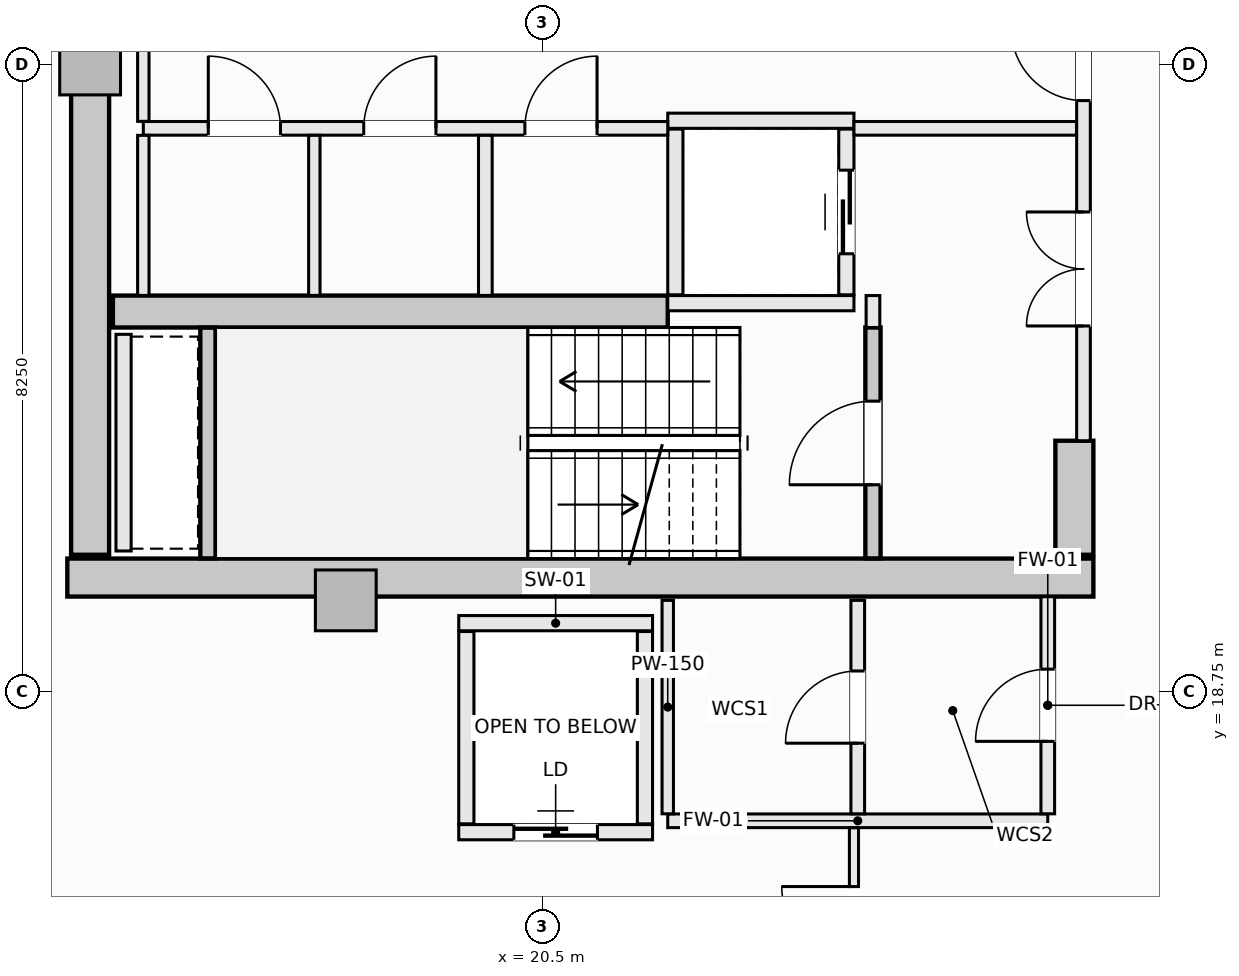
"""IFC4 building model, lengths in metres.
Left out: names, types, materials, properties, quantities, classifications, styles, units other than length and angle.
Written with IfcOpenShell. Run it as: python <this file> out.ifc"""

import sys

from ifc_helpers import new_model, si_unit, direction, frame, frame_2d, origin, origin_2d, place, context, subcontext, project, spatial, rectangle, extrude, element, fill, save


model = new_model("IFC4")
c1 = context("Model", 3, precision=1e-05, world=origin(), true_north=direction((0.0, 1.0)))
c2 = subcontext(c1, "Body", "Model", "MODEL_VIEW")
j1 = project(units=[si_unit("LENGTHUNIT", "METRE"), si_unit("PLANEANGLEUNIT", "RADIAN")], contexts=[c1])
p1 = place(None, origin())
s1 = spatial("IfcSite", under=j1, at=p1, CompositionType="ELEMENT")
p2 = place(p1, origin())
s2 = spatial("IfcBuilding", under=s1, at=p2, CompositionType="ELEMENT")
p3 = place(p2, frame((0.0, 0.0, 203.0)))
s3 = spatial("IfcBuildingStorey", under=s2, at=p3, CompositionType="ELEMENT", Elevation=203.0)
p4 = place(p3, frame((14.25, 20.25, -0.27), z_axis=(0.0, 0.0, 1.0), x_axis=(1.0, 0.0, 0.0)))
e1 = element("IfcWall", 1, at=p4, inside=s3, PredefinedType="SHEAR", context=c2, shape_type="SweptSolid", body=[
    extrude(rectangle(XDim=13.5, YDim=0.5, at=frame_2d((6.75, 0.0))), origin(), (0.0, 0.0, 1.0), 3.3),
])
p5 = place(p3, frame((14.55, 20.55, -0.27), z_axis=(0.0, 0.0, 1.0), x_axis=(0.0, 1.0, 0.0)))
e2 = element("IfcWall", 2, at=p5, inside=s3, PredefinedType="SHEAR", context=c2, shape_type="SweptSolid", body=[
    extrude(rectangle(XDim=12.9, YDim=0.5, at=frame_2d((6.45, 0.0))), origin(), (0.0, 0.0, 1.0), 3.3),
])
p6 = place(p3, frame((27.5, 20.55, -0.27), z_axis=(0.0, 0.0, 1.0), x_axis=(0.0, 1.0, 0.0)))
e3 = element("IfcWall", 3, at=p6, inside=s3, PredefinedType="SHEAR", context=c2, shape_type="SweptSolid", body=[
    extrude(rectangle(XDim=1.5, YDim=0.5, at=frame_2d((0.75, 0.0))), origin(), (0.0, 0.0, 1.0), 3.3),
])
p7 = place(p3, frame((14.85, 23.75, -0.27), z_axis=(0.0, 0.0, 1.0), x_axis=(1.0, 0.0, 0.0)))
e4 = element("IfcWall", 4, at=p7, inside=s3, PredefinedType="SHEAR", context=c2, shape_type="SweptSolid", body=[
    extrude(rectangle(XDim=7.3, YDim=0.42, at=frame_2d((3.65, 0.0))), origin(), (0.0, 0.0, 1.0), 3.3),
])
for number, where, z_axis, x_axis in (
    (5, (14.55, 27.0, -0.27), (0.0, 0.0, 1.0), (1.0, 0.0, 0.0)),
    (6, (17.914, 19.95, -0.27), (0.0, 0.0, 1.0), (1.0, 0.0, 0.0)),
):
    element("IfcColumn", number, at=place(p3, frame(where, z_axis=z_axis, x_axis=x_axis)), inside=s3, PredefinedType="PILASTER", context=c2, shape_type="SweptSolid", body=[
        extrude(rectangle(XDim=0.8, YDim=0.8, at=origin_2d()), origin(), (0.0, 0.0, 1.0), 3.3),
    ])
p8 = place(p3, frame((8.691, 17.1, 0.0), z_axis=(0.0, 0.0, 1.0), x_axis=(0.901348331142, -0.433094892545, 0.0)))
e7 = element("IfcWall", 7, at=p8, inside=s3, PredefinedType="SOLIDWALL", context=c2, shape_type="SweptSolid", body=[
    extrude(rectangle(XDim=6.021, YDim=0.3, at=frame_2d((3.01, 0.0))), origin(), (0.0, 0.0, 1.0), 2.605),
])
p9 = place(p8, frame((2.85, 0.0, 0.72)))
e8 = element("IfcOpeningElement", 8, at=p9, cuts=e7, PredefinedType="OPENING", context=c2, shape_type="SweptSolid", body=[
    extrude(rectangle(XDim=2.2, YDim=1.65, at=frame_2d((1.1, 0.825))), frame((0.0, 0.16, 0.0), z_axis=(0.0, -1.0, 0.0), x_axis=(1.0, 0.0, 0.0)), (0.0, 0.0, 1.0), 0.32),
])
p10 = place(p3, frame((24.85, 20.502, -0.27), z_axis=(0.0, 0.0, 1.0), x_axis=(0.0, 1.0, 0.0)))
e9 = element("IfcWall", 9, at=p10, inside=s3, PredefinedType="SHEAR", context=c2, shape_type="SweptSolid", body=[
    extrude(rectangle(XDim=3.038, YDim=0.2, at=frame_2d((1.519, 0.0))), origin(), (0.0, 0.0, 1.0), 3.3),
])
p11 = place(p10, frame((0.969, 0.0, 0.27)))
e10 = element("IfcOpeningElement", 10, at=p11, cuts=e9, PredefinedType="OPENING", context=c2, shape_type="SweptSolid", body=[
    extrude(rectangle(XDim=1.1, YDim=2.15, at=frame_2d((0.55, 1.075))), frame((0.0, 0.11, 0.0), z_axis=(0.0, -1.0, 0.0), x_axis=(1.0, 0.0, 0.0)), (0.0, 0.0, 1.0), 0.22),
])
p12 = place(p3, frame((16.1, 20.502, -0.27), z_axis=(0.0, 0.0, 1.0), x_axis=(0.0, 1.0, 0.0)))
e11 = element("IfcWall", 11, at=p12, inside=s3, PredefinedType="SHEAR", context=c2, shape_type="SweptSolid", body=[
    extrude(rectangle(XDim=3.036, YDim=0.2, at=frame_2d((1.518, 0.0))), origin(), (0.0, 0.0, 1.0), 3.3),
])
for number, where, z_axis, x_axis in (
    (12, (22.15, 26.26, 0.0), (0.0, 0.0, 1.0), (1.0, 0.0, 0.0)),
    (13, (22.15, 23.86, 0.0), (0.0, 0.0, 1.0), (1.0, 0.0, 0.0)),
):
    element("IfcWall", number, at=place(p3, frame(where, z_axis=z_axis, x_axis=x_axis)), inside=s3, PredefinedType="SOLIDWALL", context=c2, shape_type="SweptSolid", body=[
        extrude(rectangle(XDim=2.45, YDim=0.2, at=frame_2d((1.225, 0.0))), origin(), (0.0, 0.0, 1.0), 3.03),
    ])
p13 = place(p3, frame((22.25, 23.97, 0.0), z_axis=(0.0, 0.0, 1.0), x_axis=(0.0, 1.0, 0.0)))
e14 = element("IfcWall", 14, at=p13, inside=s3, PredefinedType="SOLIDWALL", context=c2, shape_type="SweptSolid", body=[
    extrude(rectangle(XDim=2.18, YDim=0.2, at=frame_2d((1.09, 0.0))), origin(), (0.0, 0.0, 1.0), 3.03),
])
p14 = place(p3, frame((24.5, 23.97, 0.0), z_axis=(0.0, 0.0, 1.0), x_axis=(0.0, 1.0, 0.0)))
e15 = element("IfcWall", 15, at=p14, inside=s3, PredefinedType="SOLIDWALL", context=c2, shape_type="SweptSolid", body=[
    extrude(rectangle(XDim=2.18, YDim=0.2, at=frame_2d((1.09, 0.0))), origin(), (0.0, 0.0, 1.0), 3.03),
])
p15 = place(p14, frame((0.54, 0.0, 0.0)))
e16 = element("IfcOpeningElement", 16, at=p15, cuts=e15, PredefinedType="OPENING", context=c2, shape_type="SweptSolid", body=[
    extrude(rectangle(XDim=1.1, YDim=2.2, at=frame_2d((0.55, 1.1))), frame((0.0, 0.11, 0.0), z_axis=(0.0, -1.0, 0.0), x_axis=(1.0, 0.0, 0.0)), (0.0, 0.0, 1.0), 0.22),
])
p16 = place(p3, frame((19.4, 19.65, 0.0), z_axis=(0.0, 0.0, 1.0), x_axis=(1.0, 0.0, 0.0)))
e17 = element("IfcWall", 17, at=p16, inside=s3, PredefinedType="SOLIDWALL", context=c2, shape_type="SweptSolid", body=[
    extrude(rectangle(XDim=2.55, YDim=0.2, at=frame_2d((1.275, 0.0))), origin(), (0.0, 0.0, 1.0), 3.03),
])
p17 = place(p3, frame((19.4, 16.9, 0.0), z_axis=(0.0, 0.0, 1.0), x_axis=(1.0, 0.0, 0.0)))
e18 = element("IfcWall", 18, at=p17, inside=s3, PredefinedType="SOLIDWALL", context=c2, shape_type="SweptSolid", body=[
    extrude(rectangle(XDim=2.55, YDim=0.2, at=frame_2d((1.275, 0.0))), origin(), (0.0, 0.0, 1.0), 3.03),
])
p18 = place(p17, frame((0.725, 0.0, 0.0)))
e19 = element("IfcOpeningElement", 19, at=p18, cuts=e18, PredefinedType="OPENING", context=c2, shape_type="SweptSolid", body=[
    extrude(rectangle(XDim=1.1, YDim=2.2, at=frame_2d((0.55, 1.1))), frame((0.0, 0.11, 0.0), z_axis=(0.0, -1.0, 0.0), x_axis=(1.0, 0.0, 0.0)), (0.0, 0.0, 1.0), 0.22),
])
for number, where, z_axis, x_axis in (
    (20, (19.5, 17.01, 0.0), (0.0, 0.0, 1.0), (0.0, 1.0, 0.0)),
    (21, (21.85, 17.01, 0.0), (0.0, 0.0, 1.0), (0.0, 1.0, 0.0)),
):
    element("IfcWall", number, at=place(p3, frame(where, z_axis=z_axis, x_axis=x_axis)), inside=s3, PredefinedType="SOLIDWALL", context=c2, shape_type="SweptSolid", body=[
        extrude(rectangle(XDim=2.53, YDim=0.2, at=frame_2d((1.265, 0.0))), origin(), (0.0, 0.0, 1.0), 3.03),
    ])
p19 = place(p3, frame((14.99, 20.6, 0.0), z_axis=(0.0, 0.0, 1.0), x_axis=(0.0, 1.0, 0.0)))
e22 = element("IfcWall", 22, at=p19, inside=s3, PredefinedType="SOLIDWALL", context=c2, shape_type="SweptSolid", body=[
    extrude(rectangle(XDim=2.85, YDim=0.2, at=frame_2d((1.425, 0.0))), origin(), (0.0, 0.0, 1.0), 3.03),
])
p20 = place(p3, frame((24.85, 23.54, 0.0), z_axis=(0.0, 0.0, 1.0), x_axis=(0.0, 1.0, 0.0)))
e23 = element("IfcWall", 23, at=p20, inside=s3, PredefinedType="SOLIDWALL", context=c2, shape_type="SweptSolid", body=[
    extrude(rectangle(XDim=0.42, YDim=0.18, at=frame_2d((0.21, 0.0))), origin(), (0.0, 0.0, 1.0), 3.03),
])
p21 = place(p3, frame((27.62, 22.05, 0.0), z_axis=(0.0, 0.0, 1.0), x_axis=(0.0, 1.0, 0.0)))
e24 = element("IfcWall", 24, at=p21, inside=s3, PredefinedType="SOLIDWALL", context=c2, shape_type="SweptSolid", body=[
    extrude(rectangle(XDim=9.9, YDim=0.18, at=frame_2d((4.95, 0.0))), origin(), (0.0, 0.0, 1.0), 3.03),
])
p22 = place(p21, frame((4.475, 0.0, 0.0)))
e25 = element("IfcOpeningElement", 25, at=p22, cuts=e24, PredefinedType="OPENING", context=c2, shape_type="SweptSolid", body=[
    extrude(rectangle(XDim=0.95, YDim=2.1, at=frame_2d((0.475, 1.05))), frame((0.0, 0.1, 0.0), z_axis=(0.0, -1.0, 0.0), x_axis=(1.0, 0.0, 0.0)), (0.0, 0.0, 1.0), 0.2),
])
p23 = place(p21, frame((6.89, 0.0, 0.0)))
e26 = element("IfcOpeningElement", 26, at=p23, cuts=e24, PredefinedType="OPENING", context=c2, shape_type="SweptSolid", body=[
    extrude(rectangle(XDim=1.5, YDim=2.2, at=frame_2d((0.75, 1.1))), frame((0.0, 0.1, 0.0), z_axis=(0.0, -1.0, 0.0), x_axis=(1.0, 0.0, 0.0)), (0.0, 0.0, 1.0), 0.2),
])
p24 = place(p21, frame((1.51, 0.0, 0.0)))
e27 = element("IfcOpeningElement", 27, at=p24, cuts=e24, PredefinedType="OPENING", context=c2, shape_type="SweptSolid", body=[
    extrude(rectangle(XDim=1.5, YDim=2.2, at=frame_2d((0.75, 1.1))), frame((0.0, 0.1, 0.0), z_axis=(0.0, -1.0, 0.0), x_axis=(1.0, 0.0, 0.0)), (0.0, 0.0, 1.0), 0.2),
])
p25 = place(p3, frame((15.25, 26.16, 0.0), z_axis=(0.0, 0.0, 1.0), x_axis=(1.0, 0.0, 0.0)))
e28 = element("IfcWall", 28, at=p25, inside=s3, PredefinedType="SOLIDWALL", context=c2, shape_type="SweptSolid", body=[
    extrude(rectangle(XDim=6.9, YDim=0.18, at=frame_2d((3.45, 0.0))), origin(), (0.0, 0.0, 1.0), 3.03),
])
p26 = place(p25, frame((5.02, 0.0, 0.0)))
e29 = element("IfcOpeningElement", 29, at=p26, cuts=e28, PredefinedType="OPENING", context=c2, shape_type="SweptSolid", body=[
    extrude(rectangle(XDim=0.95, YDim=2.1, at=frame_2d((0.475, 1.05))), frame((0.0, 0.1, 0.0), z_axis=(0.0, -1.0, 0.0), x_axis=(1.0, 0.0, 0.0)), (0.0, 0.0, 1.0), 0.2),
])
p27 = place(p25, frame((0.855, 0.0, 0.0)))
e30 = element("IfcOpeningElement", 30, at=p27, cuts=e28, PredefinedType="OPENING", context=c2, shape_type="SweptSolid", body=[
    extrude(rectangle(XDim=0.95, YDim=2.1, at=frame_2d((0.475, 1.05))), frame((0.0, 0.1, 0.0), z_axis=(0.0, -1.0, 0.0), x_axis=(1.0, 0.0, 0.0)), (0.0, 0.0, 1.0), 0.2),
])
p28 = place(p25, frame((2.9, 0.0, 0.0)))
e31 = element("IfcOpeningElement", 31, at=p28, cuts=e28, PredefinedType="OPENING", context=c2, shape_type="SweptSolid", body=[
    extrude(rectangle(XDim=0.95, YDim=2.1, at=frame_2d((0.475, 1.05))), frame((0.0, 0.1, 0.0), z_axis=(0.0, -1.0, 0.0), x_axis=(1.0, 0.0, 0.0)), (0.0, 0.0, 1.0), 0.2),
])
p29 = place(p3, frame((24.6, 26.16, 0.0), z_axis=(0.0, 0.0, 1.0), x_axis=(1.0, 0.0, 0.0)))
e32 = element("IfcWall", 32, at=p29, inside=s3, PredefinedType="SOLIDWALL", context=c2, shape_type="SweptSolid", body=[
    extrude(rectangle(XDim=2.928, YDim=0.18, at=frame_2d((1.464, 0.0))), origin(), (0.0, 0.0, 1.0), 3.03),
])
p30 = place(p3, frame((15.25, 23.962, 0.0), z_axis=(0.0, 0.0, 1.0), x_axis=(0.0, 1.0, 0.0)))
e33 = element("IfcWall", 33, at=p30, inside=s3, PredefinedType="PARTITIONING", context=c2, shape_type="SweptSolid", body=[
    extrude(rectangle(XDim=2.106, YDim=0.15, at=frame_2d((1.053, 0.0))), origin(), (0.0, 0.0, 1.0), 3.03),
])
p31 = place(p3, frame((15.25, 26.252, 0.0), z_axis=(0.0, 0.0, 1.0), x_axis=(0.0, 1.0, 0.0)))
e34 = element("IfcWall", 34, at=p31, inside=s3, PredefinedType="PARTITIONING", context=c2, shape_type="SweptSolid", body=[
    extrude(rectangle(XDim=1.496, YDim=0.15, at=frame_2d((0.748, 0.0))), origin(), (0.0, 0.0, 1.0), 3.03),
])
p32 = place(p3, frame((19.75, 23.962, 0.0), z_axis=(0.0, 0.0, 1.0), x_axis=(0.0, 1.0, 0.0)))
e35 = element("IfcWall", 35, at=p32, inside=s3, PredefinedType="SOLIDWALL", context=c2, shape_type="SweptSolid", body=[
    extrude(rectangle(XDim=2.106, YDim=0.18, at=frame_2d((1.053, 0.0))), origin(), (0.0, 0.0, 1.0), 3.03),
])
p33 = place(p3, frame((17.5, 23.962, 0.0), z_axis=(0.0, 0.0, 1.0), x_axis=(0.0, 1.0, 0.0)))
e36 = element("IfcWall", 36, at=p33, inside=s3, PredefinedType="PARTITIONING", context=c2, shape_type="SweptSolid", body=[
    extrude(rectangle(XDim=2.106, YDim=0.15, at=frame_2d((1.053, 0.0))), origin(), (0.0, 0.0, 1.0), 3.03),
])
p34 = place(p3, frame((22.15, 17.05, 0.0), z_axis=(0.0, 0.0, 1.0), x_axis=(1.0, 0.0, 0.0)))
e37 = element("IfcWall", 37, at=p34, inside=s3, PredefinedType="SOLIDWALL", context=c2, shape_type="SweptSolid", body=[
    extrude(rectangle(XDim=5.0, YDim=0.18, at=frame_2d((2.5, 0.0))), origin(), (0.0, 0.0, 1.0), 3.03),
])
p35 = place(p3, frame((22.15, 17.142, 0.0), z_axis=(0.0, 0.0, 1.0), x_axis=(0.0, 1.0, 0.0)))
e38 = element("IfcWall", 38, at=p35, inside=s3, PredefinedType="PARTITIONING", context=c2, shape_type="SweptSolid", body=[
    extrude(rectangle(XDim=2.808, YDim=0.15, at=frame_2d((1.404, 0.0))), origin(), (0.0, 0.0, 1.0), 3.03),
])
p36 = place(p3, frame((24.65, 17.142, 0.0), z_axis=(0.0, 0.0, 1.0), x_axis=(0.0, 1.0, 0.0)))
e39 = element("IfcWall", 39, at=p36, inside=s3, PredefinedType="SOLIDWALL", context=c2, shape_type="SweptSolid", body=[
    extrude(rectangle(XDim=2.808, YDim=0.18, at=frame_2d((1.404, 0.0))), origin(), (0.0, 0.0, 1.0), 3.03),
])
p37 = place(p36, frame((0.929, 0.0, 0.0)))
e40 = element("IfcOpeningElement", 40, at=p37, cuts=e39, PredefinedType="OPENING", context=c2, shape_type="SweptSolid", body=[
    extrude(rectangle(XDim=0.95, YDim=2.1, at=frame_2d((0.475, 1.05))), frame((0.0, 0.1, 0.0), z_axis=(0.0, -1.0, 0.0), x_axis=(1.0, 0.0, 0.0)), (0.0, 0.0, 1.0), 0.2),
])
p38 = place(p3, frame((27.15, 17.142, 0.0), z_axis=(0.0, 0.0, 1.0), x_axis=(0.0, 1.0, 0.0)))
e41 = element("IfcWall", 41, at=p38, inside=s3, PredefinedType="SOLIDWALL", context=c2, shape_type="SweptSolid", body=[
    extrude(rectangle(XDim=2.856, YDim=0.18, at=frame_2d((1.428, 0.0))), origin(), (0.0, 0.0, 1.0), 3.03),
])
p39 = place(p38, frame((0.953, 0.0, 0.0)))
e42 = element("IfcOpeningElement", 42, at=p39, cuts=e41, PredefinedType="OPENING", context=c2, shape_type="SweptSolid", body=[
    extrude(rectangle(XDim=0.95, YDim=2.1, at=frame_2d((0.475, 1.05))), frame((0.0, 0.1, 0.0), z_axis=(0.0, -1.0, 0.0), x_axis=(1.0, 0.0, 0.0)), (0.0, 0.0, 1.0), 0.2),
])
p40 = place(p3, frame((24.6, 14.462, 0.0), z_axis=(0.0, 0.0, 1.0), x_axis=(0.0, 1.0, 0.0)))
e43 = element("IfcWall", 43, at=p40, inside=s3, PredefinedType="PARTITIONING", context=c2, shape_type="SweptSolid", body=[
    extrude(rectangle(XDim=2.496, YDim=0.12, at=frame_2d((1.248, 0.0))), origin(), (0.0, 0.0, 1.0), 3.03),
])
p41 = place(p40, frame((0.773, 0.0, 0.0)))
e44 = element("IfcOpeningElement", 44, at=p41, cuts=e43, PredefinedType="OPENING", context=c2, shape_type="SweptSolid", body=[
    extrude(rectangle(XDim=0.95, YDim=2.1, at=frame_2d((0.475, 1.05))), frame((0.0, 0.07, 0.0), z_axis=(0.0, -1.0, 0.0), x_axis=(1.0, 0.0, 0.0)), (0.0, 0.0, 1.0), 0.14),
])
p42 = place(p3, frame((11.199, 16.063, 0.0), z_axis=(0.0, 0.0, 1.0), x_axis=(0.994553027345, -0.104231836785, 0.0)))
e45 = element("IfcWall", 45, at=p42, inside=s3, PredefinedType="PARTITIONING", context=c2, shape_type="SweptSolid", body=[
    extrude(rectangle(XDim=13.412, YDim=0.12, at=frame_2d((6.706, 0.0))), origin(), (0.0, 0.0, 1.0), 2.605),
])
p43 = place(p11, origin())
e46 = element("IfcDoor", 46, at=p43, inside=s3, OperationType="SINGLE_SWING_LEFT", PredefinedType="DOOR", context=c2, shape_type="SweptSolid", body=[
    extrude(rectangle(XDim=1.1, YDim=2.15, at=frame_2d((0.55, 1.075))), frame((0.0, 0.025, 0.0), z_axis=(0.0, -1.0, 0.0), x_axis=(1.0, 0.0, 0.0)), (0.0, 0.0, 1.0), 0.05),
])
fill(e10, e46)
p44 = place(p15, origin())
e47 = element("IfcDoor", 47, at=p44, inside=s3, OperationType="SLIDING_TO_LEFT", PredefinedType="DOOR", context=c2, shape_type="SweptSolid", body=[
    extrude(rectangle(XDim=1.1, YDim=2.2, at=frame_2d((0.55, 1.1))), frame((0.0, 0.025, 0.0), z_axis=(0.0, -1.0, 0.0), x_axis=(1.0, 0.0, 0.0)), (0.0, 0.0, 1.0), 0.05),
])
fill(e16, e47)
p45 = place(p18, origin())
e48 = element("IfcDoor", 48, at=p45, inside=s3, OperationType="SLIDING_TO_LEFT", PredefinedType="DOOR", context=c2, shape_type="SweptSolid", body=[
    extrude(rectangle(XDim=1.1, YDim=2.2, at=frame_2d((0.55, 1.1))), frame((0.0, 0.025, 0.0), z_axis=(0.0, -1.0, 0.0), x_axis=(1.0, 0.0, 0.0)), (0.0, 0.0, 1.0), 0.05),
])
fill(e19, e48)
p46 = place(p22, origin())
e49 = element("IfcDoor", 49, at=p46, inside=s3, OperationType="SINGLE_SWING_RIGHT", PredefinedType="DOOR", context=c2, shape_type="SweptSolid", body=[
    extrude(rectangle(XDim=0.95, YDim=2.1, at=frame_2d((0.475, 1.05))), frame((0.0, 0.025, 0.0), z_axis=(0.0, -1.0, 0.0), x_axis=(1.0, 0.0, 0.0)), (0.0, 0.0, 1.0), 0.05),
])
fill(e25, e49)
p47 = place(p24, origin())
e50 = element("IfcDoor", 50, at=p47, inside=s3, OperationType="DOUBLE_DOOR_SINGLE_SWING", PredefinedType="DOOR", context=c2, shape_type="SweptSolid", body=[
    extrude(rectangle(XDim=1.5, YDim=2.2, at=frame_2d((0.75, 1.1))), frame((0.0, 0.025, 0.0), z_axis=(0.0, -1.0, 0.0), x_axis=(1.0, 0.0, 0.0)), (0.0, 0.0, 1.0), 0.05),
])
fill(e27, e50)
p48 = place(p26, origin())
e51 = element("IfcDoor", 51, at=p48, inside=s3, OperationType="SINGLE_SWING_RIGHT", PredefinedType="DOOR", context=c2, shape_type="SweptSolid", body=[
    extrude(rectangle(XDim=0.95, YDim=2.1, at=frame_2d((0.475, 1.05))), frame((0.0, 0.025, 0.0), z_axis=(0.0, -1.0, 0.0), x_axis=(1.0, 0.0, 0.0)), (0.0, 0.0, 1.0), 0.05),
])
fill(e29, e51)
p49 = place(p27, origin())
e52 = element("IfcDoor", 52, at=p49, inside=s3, OperationType="SINGLE_SWING_LEFT", PredefinedType="DOOR", context=c2, shape_type="SweptSolid", body=[
    extrude(rectangle(XDim=0.95, YDim=2.1, at=frame_2d((0.475, 1.05))), frame((0.0, 0.025, 0.0), z_axis=(0.0, -1.0, 0.0), x_axis=(1.0, 0.0, 0.0)), (0.0, 0.0, 1.0), 0.05),
])
fill(e30, e52)
p50 = place(p28, origin())
e53 = element("IfcDoor", 53, at=p50, inside=s3, OperationType="SINGLE_SWING_RIGHT", PredefinedType="DOOR", context=c2, shape_type="SweptSolid", body=[
    extrude(rectangle(XDim=0.95, YDim=2.1, at=frame_2d((0.475, 1.05))), frame((0.0, 0.025, 0.0), z_axis=(0.0, -1.0, 0.0), x_axis=(1.0, 0.0, 0.0)), (0.0, 0.0, 1.0), 0.05),
])
fill(e31, e53)
p51 = place(p39, origin())
e54 = element("IfcDoor", 54, at=p51, inside=s3, OperationType="SINGLE_SWING_LEFT", PredefinedType="DOOR", context=c2, shape_type="SweptSolid", body=[
    extrude(rectangle(XDim=0.95, YDim=2.1, at=frame_2d((0.475, 1.05))), frame((0.0, 0.025, 0.0), z_axis=(0.0, -1.0, 0.0), x_axis=(1.0, 0.0, 0.0)), (0.0, 0.0, 1.0), 0.05),
])
fill(e42, e54)
p52 = place(p41, origin())
e55 = element("IfcDoor", 55, at=p52, inside=s3, OperationType="SINGLE_SWING_RIGHT", PredefinedType="DOOR", context=c2, shape_type="SweptSolid", body=[
    extrude(rectangle(XDim=0.95, YDim=2.1, at=frame_2d((0.475, 1.05))), frame((0.0, 0.025, 0.0), z_axis=(0.0, -1.0, 0.0), x_axis=(1.0, 0.0, 0.0)), (0.0, 0.0, 1.0), 0.05),
])
fill(e44, e55)
p53 = place(p37, origin())
e56 = element("IfcDoor", 56, at=p53, inside=s3, OperationType="SINGLE_SWING_LEFT", PredefinedType="DOOR", context=c2, shape_type="SweptSolid", body=[
    extrude(rectangle(XDim=0.95, YDim=2.1, at=frame_2d((0.475, 1.05))), frame((0.0, 0.025, 0.0), z_axis=(0.0, -1.0, 0.0), x_axis=(1.0, 0.0, 0.0)), (0.0, 0.0, 1.0), 0.05),
])
fill(e40, e56)
save(model, sys.argv[1])
